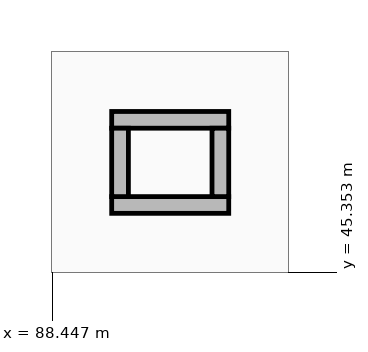
"""IFC4 building model, lengths in metres.
Left out: names, types, materials, properties, quantities, classifications, styles, units other than length and angle.
Written with IfcOpenShell. Run it as: python <this file> out.ifc"""

import sys

from ifc_helpers import new_model, si_unit, direction, frame, frame_2d, origin, place, context, subcontext, project, spatial, rectangle, extrude, element, save


model = new_model("IFC4")
c1 = context("Model", 3, precision=1e-05, world=origin(), true_north=direction((0.0, 1.0)))
c2 = subcontext(c1, "Body", "Model", "MODEL_VIEW")
j1 = project(units=[si_unit("LENGTHUNIT", "METRE"), si_unit("PLANEANGLEUNIT", "RADIAN")], contexts=[c1])
p1 = place(None, origin())
s1 = spatial("IfcSite", under=j1, at=p1, CompositionType="ELEMENT")
p2 = place(p1, origin())
s2 = spatial("IfcBuilding", under=s1, at=p2, CompositionType="ELEMENT")
p3 = place(p2, origin())
s3 = spatial("IfcBuildingStorey", under=s2, at=p3, CompositionType="ELEMENT", Elevation=0.0)
for number, where, z_axis, x_axis in (
    (1, (89.23, 46.24, 0.0), (0.0, 0.0, 1.0), (1.0, 0.0, 0.0)),
    (2, (89.23, 47.36, 0.0), (0.0, 0.0, 1.0), (1.0, 0.0, 0.0)),
):
    element("IfcWall", number, at=place(p3, frame(where, z_axis=z_axis, x_axis=x_axis)), inside=s3, PredefinedType="STANDARD", context=c2, shape_type="SweptSolid", body=[
        extrude(rectangle(XDim=1.54, YDim=0.22, at=frame_2d((0.77, 0.0))), origin(), (0.0, 0.0, 1.0), 2.6),
    ])
for number, where, z_axis, x_axis in (
    (3, (89.34, 46.35, 0.0), (0.0, 0.0, 1.0), (0.0, 1.0, 0.0)),
    (4, (90.66, 46.35, 0.0), (0.0, 0.0, 1.0), (0.0, 1.0, 0.0)),
):
    element("IfcWall", number, at=place(p3, frame(where, z_axis=z_axis, x_axis=x_axis)), inside=s3, PredefinedType="STANDARD", context=c2, shape_type="SweptSolid", body=[
        extrude(rectangle(XDim=0.9, YDim=0.22, at=frame_2d((0.45, 0.0))), origin(), (0.0, 0.0, 1.0), 2.6),
    ])
save(model, sys.argv[1])
